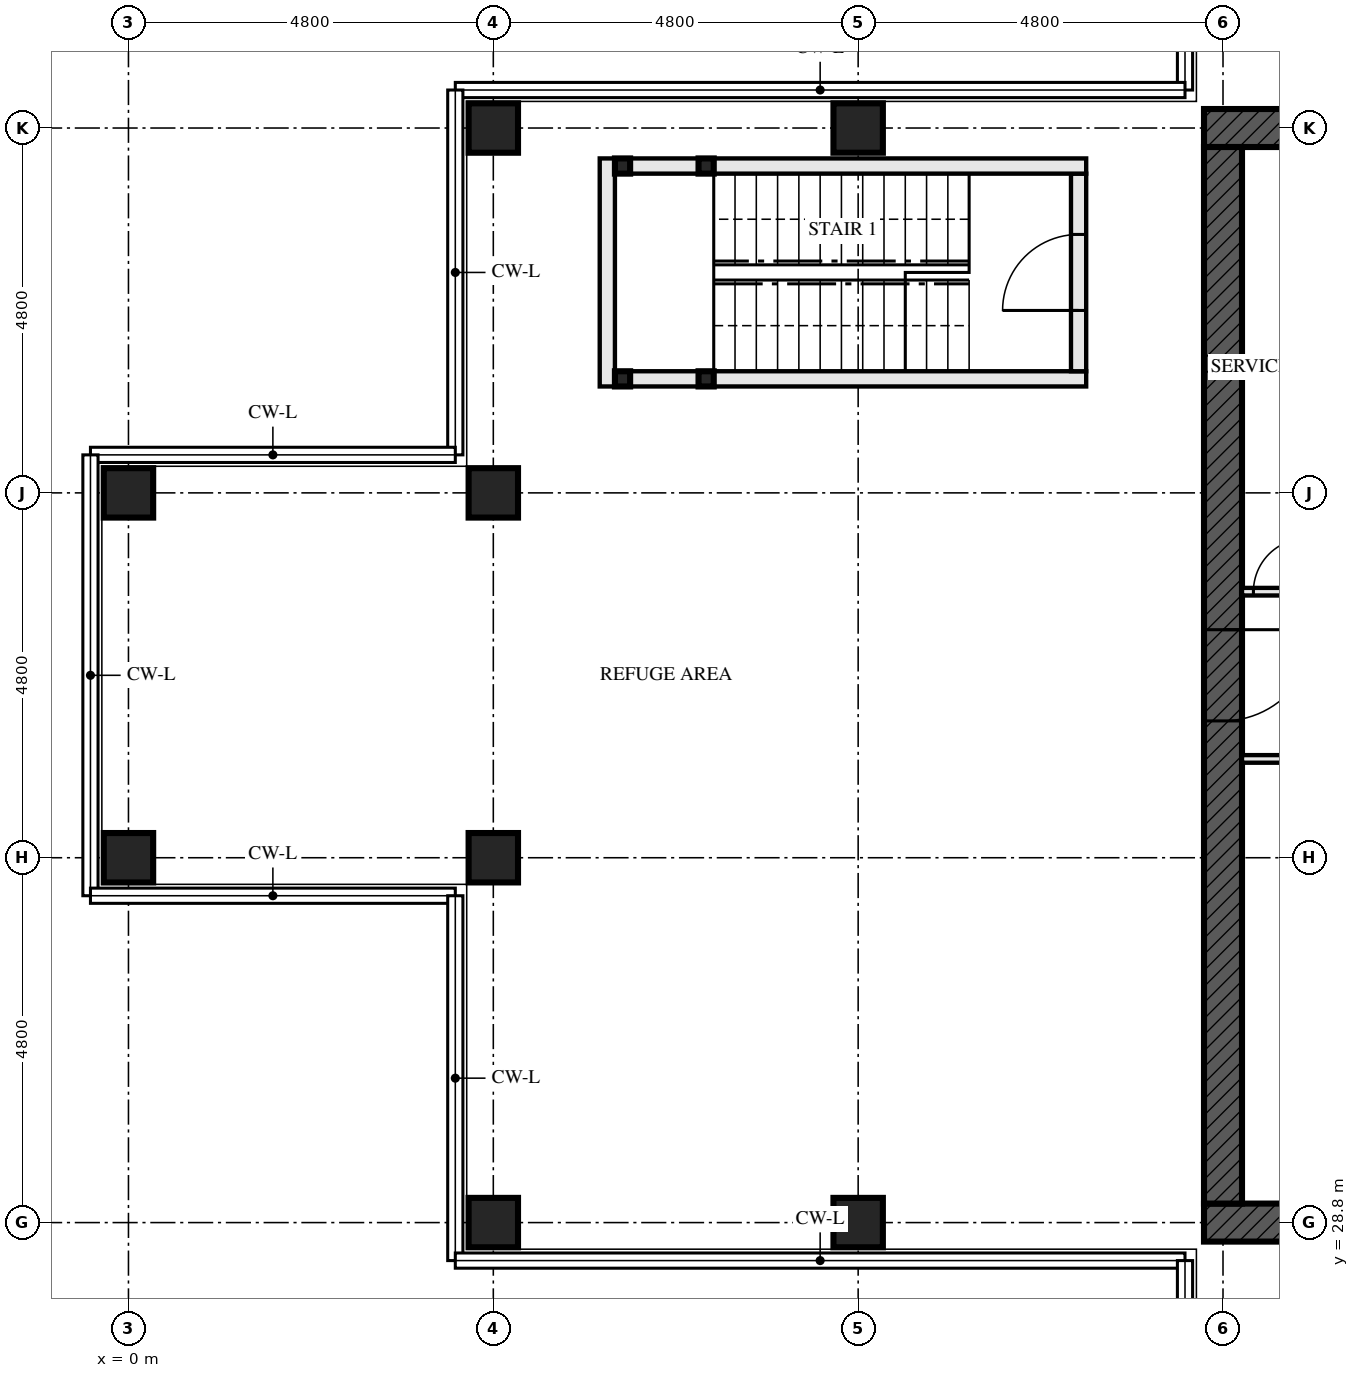
"""IFC4 building model, lengths in metres.
Left out: names, types, materials, properties, quantities, classifications, styles, units other than length and angle.
Written with IfcOpenShell. Run it as: python <this file> out.ifc"""

import sys

from ifc_helpers import new_model, si_unit, direction, frame, frame_2d, origin, origin_2d, place, context, subcontext, project, spatial, rectangle, hollow_rectangle, extrude, element, fill, save


model = new_model("IFC4")
c1 = context("Model", 3, precision=1e-05, world=origin(), true_north=direction((0.0, 1.0)))
c2 = subcontext(c1, "Body", "Model", "MODEL_VIEW")
j1 = project(units=[si_unit("LENGTHUNIT", "METRE"), si_unit("PLANEANGLEUNIT", "RADIAN")], contexts=[c1])
p1 = place(None, origin())
s1 = spatial("IfcSite", under=j1, at=p1, CompositionType="ELEMENT")
p2 = place(p1, origin())
s2 = spatial("IfcBuilding", under=s1, at=p2, CompositionType="ELEMENT")
p3 = place(p2, frame((0.0, 0.0, 190.0)))
s3 = spatial("IfcBuildingStorey", under=s2, at=p3, CompositionType="ELEMENT", Elevation=190.0)
for number, where, z_axis, x_axis in (
    (1, (0.0, 33.6, 0.0), (0.0, 0.0, 1.0), (0.0, 1.0, 0.0)),
    (2, (0.0, 38.4, 0.0), (0.0, 0.0, 1.0), (0.0, 1.0, 0.0)),
    (3, (4.8, 28.8, 0.0), (0.0, 0.0, 1.0), (0.0, 1.0, 0.0)),
    (4, (4.8, 33.6, 0.0), (0.0, 0.0, 1.0), (0.0, 1.0, 0.0)),
    (5, (4.8, 38.4, 0.0), (0.0, 0.0, 1.0), (0.0, 1.0, 0.0)),
    (6, (4.8, 43.2, 0.0), (0.0, 0.0, 1.0), (0.0, 1.0, 0.0)),
    (7, (9.6, 28.8, 0.0), (0.0, 0.0, 1.0), (0.0, 1.0, 0.0)),
    (8, (9.6, 43.2, 0.0), (0.0, 0.0, 1.0), (0.0, 1.0, 0.0)),
):
    element("IfcColumn", number, at=place(p3, frame(where, z_axis=z_axis, x_axis=x_axis)), inside=s3, PredefinedType="COLUMN", context=c2, shape_type="SweptSolid", body=[
        extrude(hollow_rectangle(XDim=0.65, YDim=0.65, WallThickness=0.08, at=origin_2d()), origin(), (0.0, 0.0, 1.0), 4.5),
    ])
p4 = place(p3, frame((14.15, 28.8, -0.25), z_axis=(0.0, 0.0, 1.0), x_axis=(1.0, 0.0, 0.0)))
e9 = element("IfcWall", 9, at=p4, inside=s3, PredefinedType="SHEAR", context=c2, shape_type="SweptSolid", body=[
    extrude(rectangle(XDim=14.9, YDim=0.5, at=frame_2d((7.45, 0.0))), origin(), (0.0, 0.0, 1.0), 4.58),
])
p5 = place(p4, frame((6.85, 0.0, 0.25)))
e10 = element("IfcOpeningElement", 10, at=p5, cuts=e9, PredefinedType="OPENING", context=c2, shape_type="SweptSolid", body=[
    extrude(rectangle(XDim=1.2, YDim=2.1, at=frame_2d((0.6, 1.05))), frame((0.0, 0.26, 0.0), z_axis=(0.0, -1.0, 0.0), x_axis=(1.0, 0.0, 0.0)), (0.0, 0.0, 1.0), 0.521),
])
p6 = place(p3, frame((29.05, 43.2, -0.25), z_axis=(0.0, 0.0, 1.0), x_axis=(-1.0, 0.0, 0.0)))
e11 = element("IfcWall", 11, at=p6, inside=s3, PredefinedType="SHEAR", context=c2, shape_type="SweptSolid", body=[
    extrude(rectangle(XDim=14.9, YDim=0.5, at=frame_2d((7.45, 0.0))), origin(), (0.0, 0.0, 1.0), 4.58),
])
p7 = place(p6, frame((6.85, 0.0, 0.25)))
e12 = element("IfcOpeningElement", 12, at=p7, cuts=e11, PredefinedType="OPENING", context=c2, shape_type="SweptSolid", body=[
    extrude(rectangle(XDim=1.2, YDim=2.1, at=frame_2d((0.6, 1.05))), frame((0.0, 0.26, 0.0), z_axis=(0.0, -1.0, 0.0), x_axis=(1.0, 0.0, 0.0)), (0.0, 0.0, 1.0), 0.521),
])
p8 = place(p3, frame((14.4, 42.95, -0.25), z_axis=(0.0, 0.0, 1.0), x_axis=(0.0, -1.0, 0.0)))
e13 = element("IfcWall", 13, at=p8, inside=s3, PredefinedType="SHEAR", context=c2, shape_type="SweptSolid", body=[
    extrude(rectangle(XDim=13.9, YDim=0.5, at=frame_2d((6.95, 0.0))), origin(), (0.0, 0.0, 1.0), 4.58),
])
p9 = place(p8, frame((6.35, 0.0, 0.25)))
e14 = element("IfcOpeningElement", 14, at=p9, cuts=e13, PredefinedType="OPENING", context=c2, shape_type="SweptSolid", body=[
    extrude(rectangle(XDim=1.2, YDim=2.1, at=frame_2d((0.6, 1.05))), frame((0.0, 0.26, 0.0), z_axis=(0.0, -1.0, 0.0), x_axis=(1.0, 0.0, 0.0)), (0.0, 0.0, 1.0), 0.521),
])
for number, where, z_axis, x_axis in (
    (15, (6.5, 42.7, 0.0), (0.0, 0.0, 1.0), (1.0, 0.0, 0.0)),
    (16, (6.5, 39.9, 0.0), (0.0, 0.0, 1.0), (1.0, 0.0, 0.0)),
    (17, (7.6, 42.7, 0.0), (0.0, 0.0, 1.0), (1.0, 0.0, 0.0)),
    (18, (7.6, 39.9, 0.0), (0.0, 0.0, 1.0), (1.0, 0.0, 0.0)),
):
    element("IfcColumn", number, at=place(p3, frame(where, z_axis=z_axis, x_axis=x_axis)), inside=s3, PredefinedType="COLUMN", context=c2, shape_type="SweptSolid", body=[
        extrude(hollow_rectangle(XDim=0.2, YDim=0.2, WallThickness=0.008, at=origin_2d()), origin(), (0.0, 0.0, 1.0), 4.33),
    ])
p10 = place(p3, frame((6.6, 42.7, 0.0), z_axis=(0.0, 0.0, 1.0), x_axis=(1.0, 0.0, 0.0)))
e19 = element("IfcWall", 19, at=p10, inside=s3, PredefinedType="SOLIDWALL", context=c2, shape_type="SweptSolid", body=[
    extrude(rectangle(XDim=0.9, YDim=0.2, at=frame_2d((0.45, 0.0))), origin(), (0.0, 0.0, 1.0), 3.99),
])
p11 = place(p3, frame((7.7, 42.7, 0.0), z_axis=(0.0, 0.0, 1.0), x_axis=(1.0, 0.0, 0.0)))
e20 = element("IfcWall", 20, at=p11, inside=s3, PredefinedType="SOLIDWALL", context=c2, shape_type="SweptSolid", body=[
    extrude(rectangle(XDim=4.9, YDim=0.2, at=frame_2d((2.45, 0.0))), origin(), (0.0, 0.0, 1.0), 3.99),
])
p12 = place(p3, frame((6.6, 39.9, 0.0), z_axis=(0.0, 0.0, 1.0), x_axis=(1.0, 0.0, 0.0)))
e21 = element("IfcWall", 21, at=p12, inside=s3, PredefinedType="SOLIDWALL", context=c2, shape_type="SweptSolid", body=[
    extrude(rectangle(XDim=0.9, YDim=0.2, at=frame_2d((0.45, 0.0))), origin(), (0.0, 0.0, 1.0), 3.99),
])
p13 = place(p3, frame((7.7, 39.9, 0.0), z_axis=(0.0, 0.0, 1.0), x_axis=(1.0, 0.0, 0.0)))
e22 = element("IfcWall", 22, at=p13, inside=s3, PredefinedType="SOLIDWALL", context=c2, shape_type="SweptSolid", body=[
    extrude(rectangle(XDim=4.9, YDim=0.2, at=frame_2d((2.45, 0.0))), origin(), (0.0, 0.0, 1.0), 3.99),
])
p14 = place(p3, frame((6.3, 42.8, 0.0), z_axis=(0.0, 0.0, 1.0), x_axis=(0.0, -1.0, 0.0)))
e23 = element("IfcWall", 23, at=p14, inside=s3, PredefinedType="SOLIDWALL", context=c2, shape_type="SweptSolid", body=[
    extrude(rectangle(XDim=3.0, YDim=0.2, at=frame_2d((1.5, 0.0))), origin(), (0.0, 0.0, 1.0), 4.33),
])
p15 = place(p3, frame((12.5, 42.6, 0.0), z_axis=(0.0, 0.0, 1.0), x_axis=(0.0, -1.0, 0.0)))
e24 = element("IfcWall", 24, at=p15, inside=s3, PredefinedType="SOLIDWALL", context=c2, shape_type="SweptSolid", body=[
    extrude(rectangle(XDim=2.6, YDim=0.2, at=frame_2d((1.3, 0.0))), origin(), (0.0, 0.0, 1.0), 4.33),
])
p16 = place(p15, frame((0.8, 0.0, 0.0)))
e25 = element("IfcOpeningElement", 25, at=p16, cuts=e24, PredefinedType="OPENING", context=c2, shape_type="SweptSolid", body=[
    extrude(rectangle(XDim=1.0, YDim=2.1, at=frame_2d((0.5, 1.05))), frame((0.0, 0.111, 0.0), z_axis=(0.0, -1.0, 0.0), x_axis=(1.0, 0.0, 0.0)), (0.0, 0.0, 1.0), 0.221),
])
p17 = place(p3, frame((14.65, 34.9, 0.0), z_axis=(0.0, 0.0, 1.0), x_axis=(1.0, 0.0, 0.0)))
e26 = element("IfcWall", 26, at=p17, inside=s3, PredefinedType="SOLIDWALL", context=c2, shape_type="SweptSolid", body=[
    extrude(rectangle(XDim=5.9, YDim=0.1, at=frame_2d((2.95, 0.0))), origin(), (0.0, 0.0, 1.0), 4.33),
])
p18 = place(p17, frame((1.6, 0.0, 0.0)))
e27 = element("IfcOpeningElement", 27, at=p18, cuts=e26, PredefinedType="OPENING", context=c2, shape_type="SweptSolid", body=[
    extrude(rectangle(XDim=0.7, YDim=2.1, at=frame_2d((0.35, 1.05))), frame((0.0, 0.061, 0.0), z_axis=(0.0, -1.0, 0.0), x_axis=(1.0, 0.0, 0.0)), (0.0, 0.0, 1.0), 0.121),
])
p19 = place(p3, frame((14.65, 37.1, 0.0), z_axis=(0.0, 0.0, 1.0), x_axis=(1.0, 0.0, 0.0)))
e28 = element("IfcWall", 28, at=p19, inside=s3, PredefinedType="SOLIDWALL", context=c2, shape_type="SweptSolid", body=[
    extrude(rectangle(XDim=5.9, YDim=0.1, at=frame_2d((2.95, 0.0))), origin(), (0.0, 0.0, 1.0), 4.33),
])
p20 = place(p19, frame((0.15, 0.0, 0.0)))
e29 = element("IfcOpeningElement", 29, at=p20, cuts=e28, PredefinedType="OPENING", context=c2, shape_type="SweptSolid", body=[
    extrude(rectangle(XDim=0.7, YDim=2.1, at=frame_2d((0.35, 1.05))), frame((0.0, 0.061, 0.0), z_axis=(0.0, -1.0, 0.0), x_axis=(1.0, 0.0, 0.0)), (0.0, 0.0, 1.0), 0.121),
])
p21 = place(p19, frame((1.5, 0.0, 0.0)))
e30 = element("IfcOpeningElement", 30, at=p21, cuts=e28, PredefinedType="OPENING", context=c2, shape_type="SweptSolid", body=[
    extrude(rectangle(XDim=0.9, YDim=2.1, at=frame_2d((0.45, 1.05))), frame((0.0, 0.061, 0.0), z_axis=(0.0, -1.0, 0.0), x_axis=(1.0, 0.0, 0.0)), (0.0, 0.0, 1.0), 0.121),
])
p22 = place(p16, frame((1.0, 0.0, 0.0), z_axis=(0.0, 0.0, 1.0), x_axis=(-1.0, 0.0, 0.0)))
e31 = element("IfcDoor", 31, at=p22, inside=s3, OperationType="SINGLE_SWING_RIGHT", PredefinedType="DOOR", context=c2, shape_type="SweptSolid", body=[
    extrude(rectangle(XDim=1.0, YDim=2.1, at=frame_2d((0.5, 1.05))), frame((0.0, 0.032, 0.0), z_axis=(0.0, -1.0, 0.0), x_axis=(1.0, 0.0, 0.0)), (0.0, 0.0, 1.0), 0.064),
])
fill(e25, e31)
p23 = place(p20, origin())
e32 = element("IfcDoor", 32, at=p23, inside=s3, OperationType="SINGLE_SWING_LEFT", PredefinedType="DOOR", context=c2, shape_type="SweptSolid", body=[
    extrude(rectangle(XDim=0.7, YDim=2.1, at=frame_2d((0.35, 1.05))), frame((0.0, 0.027, 0.0), z_axis=(0.0, -1.0, 0.0), x_axis=(1.0, 0.0, 0.0)), (0.0, 0.0, 1.0), 0.054),
])
fill(e29, e32)
p24 = place(p9, origin())
e33 = element("IfcDoor", 33, at=p24, inside=s3, OperationType="SINGLE_SWING_LEFT", PredefinedType="DOOR", context=c2, shape_type="SweptSolid", body=[
    extrude(rectangle(XDim=1.2, YDim=2.1, at=frame_2d((0.6, 1.05))), frame((0.0, 0.027, 0.0), z_axis=(0.0, -1.0, 0.0), x_axis=(1.0, 0.0, 0.0)), (0.0, 0.0, 1.0), 0.054),
])
fill(e14, e33)
save(model, sys.argv[1])
